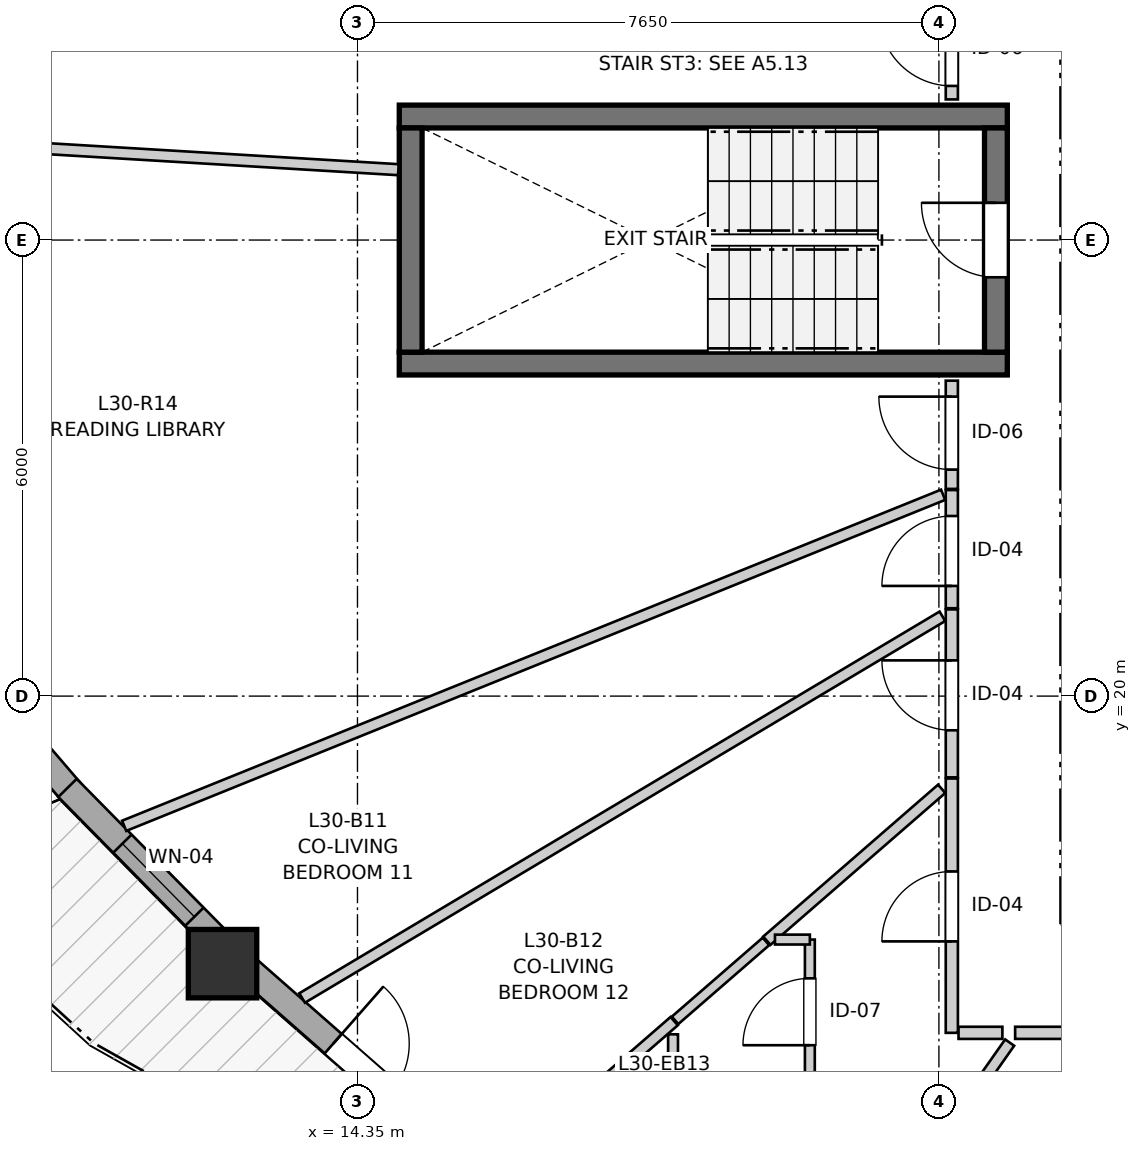
"""IFC4 building model, lengths in metres.
Left out: names, types, materials, properties, quantities, classifications, styles, units other than length and angle.
Written with IfcOpenShell. Run it as: python <this file> out.ifc"""

import sys

from ifc_helpers import new_model, si_unit, direction, frame, frame_2d, origin, origin_2d, place, context, subcontext, project, spatial, rectangle, extrude, source, transform, mapped, element, fill, save


model = new_model("IFC4")
c1 = context("Model", 3, precision=1e-05, world=origin(), true_north=direction((0.0, 1.0)))
c2 = subcontext(c1, "Body", "Model", "MODEL_VIEW")
j1 = project(units=[si_unit("LENGTHUNIT", "METRE"), si_unit("PLANEANGLEUNIT", "RADIAN")], contexts=[c1])
p1 = place(None, origin())
s1 = spatial("IfcSite", under=j1, at=p1, CompositionType="ELEMENT")
p2 = place(p1, origin())
s2 = spatial("IfcBuilding", under=s1, at=p2, CompositionType="ELEMENT")
p3 = place(p2, frame((0.0, 0.0, 102.4)))
s3 = spatial("IfcBuildingStorey", under=s2, at=p3, CompositionType="ELEMENT", Elevation=102.4)
for number, where, z_axis, x_axis in (
    (1, (14.9, 24.375, 0.0), (0.0, 0.0, 1.0), (1.0, 0.0, 0.0)),
    (2, (22.9, 27.625, 0.0), (0.0, 0.0, 1.0), (-1.0, 0.0, 0.0)),
):
    element("IfcWall", number, at=place(p3, frame(where, z_axis=z_axis, x_axis=x_axis)), inside=s3, PredefinedType="SHEAR", context=c2, shape_type="SweptSolid", body=[
        extrude(rectangle(XDim=8.0, YDim=0.3, at=frame_2d((4.0, 0.0))), origin(), (0.0, 0.0, 1.0), 2.95),
    ])
p4 = place(p3, frame((15.05, 27.475, 0.0), z_axis=(0.0, 0.0, 1.0), x_axis=(0.0, -1.0, 0.0)))
e3 = element("IfcWall", 3, at=p4, inside=s3, PredefinedType="SHEAR", context=c2, shape_type="SweptSolid", body=[
    extrude(rectangle(XDim=2.95, YDim=0.3, at=frame_2d((1.475, 0.0))), origin(), (0.0, 0.0, 1.0), 2.95),
])
p5 = place(p3, frame((22.75, 24.525, 0.0), z_axis=(0.0, 0.0, 1.0), x_axis=(0.0, 1.0, 0.0)))
e4 = element("IfcWall", 4, at=p5, inside=s3, PredefinedType="SHEAR", context=c2, shape_type="SweptSolid", body=[
    extrude(rectangle(XDim=2.95, YDim=0.3, at=frame_2d((1.475, 0.0))), origin(), (0.0, 0.0, 1.0), 2.95),
])
p6 = place(p5, frame((0.985, 0.0, 0.0)))
e5 = element("IfcOpeningElement", 5, at=p6, cuts=e4, PredefinedType="OPENING", context=c2, shape_type="SweptSolid", body=[
    extrude(rectangle(XDim=0.98, YDim=2.15, at=frame_2d((0.49, 1.075))), frame((0.0, 0.16, 0.0), z_axis=(0.0, -1.0, 0.0), x_axis=(1.0, 0.0, 0.0)), (0.0, 0.0, 1.0), 0.32),
])
m1 = source(origin(), c2, "Body", "SweptSolid", [
    extrude(rectangle(XDim=0.9, YDim=0.9, at=origin_2d()), origin(), (0.0, 0.0, 1.0), 2.95),
])
p7 = place(p3, frame((12.575, 16.48, 0.0), z_axis=(0.0, 0.0, 1.0), x_axis=(1.0, 0.0, 0.0)))
e6 = element("IfcColumn", 6, at=p7, inside=s3, PredefinedType="COLUMN", context=c2, shape_type="MappedRepresentation", body=[
    mapped(m1, transform((0.0, 0.0, 0.0), x_axis=(1.0, 0.0, 0.0), y_axis=(0.0, 1.0, 0.0), z_axis=(0.0, 0.0, 1.0), scale=1.0)),
])
p8 = place(p3, frame((8.562, 21.099, 0.0), z_axis=(0.0, 0.0, 1.0), x_axis=(0.650778499588, -0.75926763692, 0.0)))
e7 = element("IfcWall", 7, at=p8, inside=s3, PredefinedType="SOLIDWALL", context=c2, shape_type="SweptSolid", body=[
    extrude(rectangle(XDim=3.124, YDim=0.34, at=frame_2d((1.562, 0.0))), origin(), (0.0, 0.0, 1.0), 2.48),
])
p9 = place(p8, frame((0.727, 0.0, 0.82)))
e8 = element("IfcOpeningElement", 8, at=p9, cuts=e7, PredefinedType="OPENING", context=c2, shape_type="SweptSolid", body=[
    extrude(rectangle(XDim=1.65, YDim=1.45, at=frame_2d((0.825, 0.725))), frame((0.0, 0.18, 0.0), z_axis=(0.0, -1.0, 0.0), x_axis=(1.0, 0.0, 0.0)), (0.0, 0.0, 1.0), 0.36),
])
p10 = place(p3, frame((10.535, 18.792, 0.0), z_axis=(0.0, 0.0, 1.0), x_axis=(0.701902141766, -0.7122733909, 0.0)))
e9 = element("IfcWall", 9, at=p10, inside=s3, PredefinedType="SOLIDWALL", context=c2, shape_type="SweptSolid", body=[
    extrude(rectangle(XDim=2.848, YDim=0.34, at=frame_2d((1.424, 0.0))), origin(), (0.0, 0.0, 1.0), 2.48),
])
p11 = place(p10, frame((1.029, 0.0, 0.82)))
e10 = element("IfcOpeningElement", 10, at=p11, cuts=e9, PredefinedType="OPENING", context=c2, shape_type="SweptSolid", body=[
    extrude(rectangle(XDim=1.35, YDim=1.45, at=frame_2d((0.675, 0.725))), frame((0.0, 0.18, 0.0), z_axis=(0.0, -1.0, 0.0), x_axis=(1.0, 0.0, 0.0)), (0.0, 0.0, 1.0), 0.36),
])
p12 = place(p3, frame((12.86, 16.456, 0.0), z_axis=(0.0, 0.0, 1.0), x_axis=(0.751500349331, -0.659732692047, 0.0)))
e11 = element("IfcWall", 11, at=p12, inside=s3, PredefinedType="SOLIDWALL", context=c2, shape_type="SweptSolid", body=[
    extrude(rectangle(XDim=2.799, YDim=0.34, at=frame_2d((1.399, 0.0))), origin(), (0.0, 0.0, 1.0), 2.48),
])
p13 = place(p12, frame((1.559, 0.0, 0.0)))
e12 = element("IfcOpeningElement", 12, at=p13, cuts=e11, PredefinedType="OPENING", context=c2, shape_type="SweptSolid", body=[
    extrude(rectangle(XDim=1.0, YDim=2.1, at=frame_2d((0.5, 1.05))), frame((0.0, 0.18, 0.0), z_axis=(0.0, -1.0, 0.0), x_axis=(1.0, 0.0, 0.0)), (0.0, 0.0, 1.0), 0.36),
])
p14 = place(p3, frame((26.473, 15.57, 0.0), z_axis=(0.0, 0.0, 1.0), x_axis=(-1.0, 0.0, 0.0)))
e13 = element("IfcWall", 13, at=p14, inside=s3, PredefinedType="PARTITIONING", context=c2, shape_type="SweptSolid", body=[
    extrude(rectangle(XDim=3.47, YDim=0.16, at=frame_2d((1.735, 0.0))), origin(), (0.0, 0.0, 1.0), 2.95),
])
p15 = place(p14, frame((1.274, 0.0, 0.0)))
e14 = element("IfcOpeningElement", 14, at=p15, cuts=e13, PredefinedType="OPENING", context=c2, shape_type="SweptSolid", body=[
    extrude(rectangle(XDim=0.92, YDim=2.1, at=frame_2d((0.46, 1.05))), frame((0.0, 0.09, 0.0), z_axis=(0.0, -1.0, 0.0), x_axis=(1.0, 0.0, 0.0)), (0.0, 0.0, 1.0), 0.18),
])
p16 = place(p3, frame((22.17, 15.57, 0.0), z_axis=(0.0, 0.0, 1.0), x_axis=(0.0, 1.0, 0.0)))
e15 = element("IfcWall", 15, at=p16, inside=s3, PredefinedType="PARTITIONING", context=c2, shape_type="SweptSolid", body=[
    extrude(rectangle(XDim=3.346, YDim=0.16, at=frame_2d((1.673, 0.0))), origin(), (0.0, 0.0, 1.0), 2.95),
])
p17 = place(p16, frame((1.203, 0.0, 0.0)))
e16 = element("IfcOpeningElement", 16, at=p17, cuts=e15, PredefinedType="OPENING", context=c2, shape_type="SweptSolid", body=[
    extrude(rectangle(XDim=0.92, YDim=2.1, at=frame_2d((0.46, 1.05))), frame((0.0, 0.09, 0.0), z_axis=(0.0, -1.0, 0.0), x_axis=(1.0, 0.0, 0.0)), (0.0, 0.0, 1.0), 0.18),
])
p18 = place(p3, frame((22.17, 18.931, 0.0), z_axis=(0.0, 0.0, 1.0), x_axis=(0.0, 1.0, 0.0)))
e17 = element("IfcWall", 17, at=p18, inside=s3, PredefinedType="PARTITIONING", context=c2, shape_type="SweptSolid", body=[
    extrude(rectangle(XDim=2.21, YDim=0.16, at=frame_2d((1.105, 0.0))), origin(), (0.0, 0.0, 1.0), 2.95),
])
p19 = place(p18, frame((0.619, 0.0, 0.0)))
e18 = element("IfcOpeningElement", 18, at=p19, cuts=e17, PredefinedType="OPENING", context=c2, shape_type="SweptSolid", body=[
    extrude(rectangle(XDim=0.92, YDim=2.1, at=frame_2d((0.46, 1.05))), frame((0.0, 0.09, 0.0), z_axis=(0.0, -1.0, 0.0), x_axis=(1.0, 0.0, 0.0)), (0.0, 0.0, 1.0), 0.18),
])
p20 = place(p3, frame((20.302, 14.897, 0.0), z_axis=(0.0, 0.0, 1.0), x_axis=(0.0, 1.0, 0.0)))
e19 = element("IfcWall", 19, at=p20, inside=s3, PredefinedType="PARTITIONING", context=c2, shape_type="SweptSolid", body=[
    extrude(rectangle(XDim=1.9, YDim=0.13, at=frame_2d((0.95, 0.0))), origin(), (0.0, 0.0, 1.0), 2.95),
])
p21 = place(p20, frame((0.51, 0.0, 0.0)))
e20 = element("IfcOpeningElement", 20, at=p21, cuts=e19, PredefinedType="OPENING", context=c2, shape_type="SweptSolid", body=[
    extrude(rectangle(XDim=0.88, YDim=2.05, at=frame_2d((0.44, 1.025))), frame((0.0, 0.075, 0.0), z_axis=(0.0, -1.0, 0.0), x_axis=(1.0, 0.0, 0.0)), (0.0, 0.0, 1.0), 0.15),
])
p22 = place(p3, frame((22.17, 21.156, 0.0), z_axis=(0.0, 0.0, 1.0), x_axis=(0.0, 1.0, 0.0)))
e21 = element("IfcWall", 21, at=p22, inside=s3, PredefinedType="PARTITIONING", context=c2, shape_type="SweptSolid", body=[
    extrude(rectangle(XDim=1.555, YDim=0.16, at=frame_2d((0.777, 0.0))), origin(), (0.0, 0.0, 1.0), 2.95),
])
p23 = place(p22, frame((0.293, 0.0, 0.0)))
e22 = element("IfcOpeningElement", 22, at=p23, cuts=e21, PredefinedType="OPENING", context=c2, shape_type="SweptSolid", body=[
    extrude(rectangle(XDim=0.92, YDim=2.1, at=frame_2d((0.46, 1.05))), frame((0.0, 0.09, 0.0), z_axis=(0.0, -1.0, 0.0), x_axis=(1.0, 0.0, 0.0)), (0.0, 0.0, 1.0), 0.18),
])
p24 = place(p3, frame((22.17, 22.726, 0.0), z_axis=(0.0, 0.0, 1.0), x_axis=(0.0, 1.0, 0.0)))
e23 = element("IfcWall", 23, at=p24, inside=s3, PredefinedType="PARTITIONING", context=c2, shape_type="SweptSolid", body=[
    extrude(rectangle(XDim=1.424, YDim=0.16, at=frame_2d((0.712, 0.0))), origin(), (0.0, 0.0, 1.0), 2.95),
])
p25 = place(p24, frame((0.254, 0.0, 0.0)))
e24 = element("IfcOpeningElement", 24, at=p25, cuts=e23, PredefinedType="OPENING", context=c2, shape_type="SweptSolid", body=[
    extrude(rectangle(XDim=0.96, YDim=2.1, at=frame_2d((0.48, 1.05))), frame((0.0, 0.09, 0.0), z_axis=(0.0, -1.0, 0.0), x_axis=(1.0, 0.0, 0.0)), (0.0, 0.0, 1.0), 0.18),
])
p26 = place(p3, frame((22.17, 27.85, 0.0), z_axis=(0.0, 0.0, 1.0), x_axis=(0.0, 1.0, 0.0)))
e25 = element("IfcWall", 25, at=p26, inside=s3, PredefinedType="PARTITIONING", context=c2, shape_type="SweptSolid", body=[
    extrude(rectangle(XDim=1.283, YDim=0.16, at=frame_2d((0.642, 0.0))), origin(), (0.0, 0.0, 1.0), 2.95),
])
p27 = place(p26, frame((0.177, 0.0, 0.0)))
e26 = element("IfcOpeningElement", 26, at=p27, cuts=e25, PredefinedType="OPENING", context=c2, shape_type="SweptSolid", body=[
    extrude(rectangle(XDim=0.96, YDim=2.1, at=frame_2d((0.48, 1.05))), frame((0.0, 0.09, 0.0), z_axis=(0.0, -1.0, 0.0), x_axis=(1.0, 0.0, 0.0)), (0.0, 0.0, 1.0), 0.18),
])
p28 = place(p3, frame((11.28, 18.294, 0.0), z_axis=(0.0, 0.0, 1.0), x_axis=(0.927137862507, 0.374720407645, 0.0)))
e27 = element("IfcWall", 27, at=p28, inside=s3, PredefinedType="PARTITIONING", context=c2, shape_type="SweptSolid", body=[
    extrude(rectangle(XDim=11.622, YDim=0.145, at=frame_2d((5.811, 0.0))), origin(), (0.0, 0.0, 1.0), 2.95),
])
p29 = place(p3, frame((13.622, 16.028, 0.0), z_axis=(0.0, 0.0, 1.0), x_axis=(0.85896108151, 0.512040877716, 0.0)))
e28 = element("IfcWall", 28, at=p29, inside=s3, PredefinedType="PARTITIONING", context=c2, shape_type="SweptSolid", body=[
    extrude(rectangle(XDim=9.807, YDim=0.145, at=frame_2d((4.904, 0.0))), origin(), (0.0, 0.0, 1.0), 2.95),
])
p30 = place(p3, frame((6.18, 27.448, 0.0), z_axis=(0.0, 0.0, 1.0), x_axis=(0.998209995059, -0.059806402362, 0.0)))
e29 = element("IfcWall", 29, at=p30, inside=s3, PredefinedType="PARTITIONING", context=c2, shape_type="SweptSolid", body=[
    extrude(rectangle(XDim=8.724, YDim=0.145, at=frame_2d((4.362, 0.0))), origin(), (0.0, 0.0, 1.0), 2.95),
])
p31 = place(p3, frame((19.736, 16.782, 0.0), z_axis=(0.0, 0.0, 1.0), x_axis=(0.754964216329, 0.655765988796, 0.0)))
e30 = element("IfcWall", 30, at=p31, inside=s3, PredefinedType="PARTITIONING", context=c2, shape_type="SweptSolid", body=[
    extrude(rectangle(XDim=3.047, YDim=0.145, at=frame_2d((1.523, 0.0))), origin(), (0.0, 0.0, 1.0), 2.95),
])
p32 = place(p3, frame((16.33, 13.824, 0.0), z_axis=(0.0, 0.0, 1.0), x_axis=(0.754843145593, 0.655905348013, 0.0)))
e31 = element("IfcWall", 31, at=p32, inside=s3, PredefinedType="PARTITIONING", context=c2, shape_type="SweptSolid", body=[
    extrude(rectangle(XDim=2.897, YDim=0.145, at=frame_2d((1.448, 0.0))), origin(), (0.0, 0.0, 1.0), 2.95),
])
p33 = place(p3, frame((18.528, 15.734, 0.0), z_axis=(0.0, 0.0, 1.0), x_axis=(0.755063236967, 0.655651971843, 0.0)))
e32 = element("IfcWall", 32, at=p33, inside=s3, PredefinedType="PARTITIONING", context=c2, shape_type="SweptSolid", body=[
    extrude(rectangle(XDim=1.584, YDim=0.13, at=frame_2d((0.792, 0.0))), origin(), (0.0, 0.0, 1.0), 2.95),
])
p34 = place(p3, frame((22.37, 14.643, 0.0), z_axis=(0.0, 0.0, 1.0), x_axis=(0.575022445487, 0.818137633401, 0.0)))
e33 = element("IfcWall", 33, at=p34, inside=s3, PredefinedType="PARTITIONING", context=c2, shape_type="SweptSolid", body=[
    extrude(rectangle(XDim=0.976, YDim=0.145, at=frame_2d((0.488, 0.0))), origin(), (0.0, 0.0, 1.0), 2.95),
])
p35 = place(p3, frame((22.258, 15.57, 0.0), z_axis=(0.0, 0.0, 1.0), x_axis=(1.0, 0.0, 0.0)))
e34 = element("IfcWall", 34, at=p35, inside=s3, PredefinedType="PARTITIONING", context=c2, shape_type="SweptSolid", body=[
    extrude(rectangle(XDim=0.577, YDim=0.16, at=frame_2d((0.289, 0.0))), origin(), (0.0, 0.0, 1.0), 2.95),
])
p36 = place(p3, frame((18.502, 14.97, 0.0), z_axis=(0.0, 0.0, 1.0), x_axis=(0.0, 1.0, 0.0)))
e35 = element("IfcWall", 35, at=p36, inside=s3, PredefinedType="PARTITIONING", context=c2, shape_type="SweptSolid", body=[
    extrude(rectangle(XDim=0.581, YDim=0.13, at=frame_2d((0.29, 0.0))), origin(), (0.0, 0.0, 1.0), 2.95),
])
p37 = place(p3, frame((19.843, 16.797, 0.0), z_axis=(0.0, 0.0, 1.0), x_axis=(1.0, 0.0, 0.0)))
e36 = element("IfcWall", 36, at=p37, inside=s3, PredefinedType="PARTITIONING", context=c2, shape_type="SweptSolid", body=[
    extrude(rectangle(XDim=0.459, YDim=0.13, at=frame_2d((0.229, 0.0))), origin(), (0.0, 0.0, 1.0), 2.95),
])
m2 = source(origin(), c2, "Body", "SweptSolid", [
    extrude(rectangle(XDim=1.35, YDim=1.45, at=frame_2d((0.675, 0.725))), frame((0.0, 0.03, 0.0), z_axis=(0.0, -1.0, 0.0), x_axis=(1.0, 0.0, 0.0)), (0.0, 0.0, 1.0), 0.06),
])
p38 = place(p11, origin())
e37 = element("IfcWindow", 37, at=p38, inside=s3, PartitioningType="SINGLE_PANEL", PredefinedType="WINDOW", context=c2, shape_type="MappedRepresentation", body=[
    mapped(m2, transform((0.0, 0.0, 0.0), x_axis=(1.0, 0.0, 0.0), y_axis=(0.0, 1.0, 0.0), z_axis=(0.0, 0.0, 1.0), scale=1.0)),
])
fill(e10, e37)
m3 = source(origin(), c2, "Body", "SweptSolid", [
    extrude(rectangle(XDim=1.0, YDim=2.1, at=frame_2d((0.5, 1.05))), frame((0.0, 0.025, 0.0), z_axis=(0.0, -1.0, 0.0), x_axis=(1.0, 0.0, 0.0)), (0.0, 0.0, 1.0), 0.05),
])
p39 = place(p13, origin())
e38 = element("IfcDoor", 38, at=p39, inside=s3, OperationType="SINGLE_SWING_LEFT", PredefinedType="DOOR", context=c2, shape_type="MappedRepresentation", body=[
    mapped(m3, transform((0.0, 0.0, 0.0), x_axis=(1.0, 0.0, 0.0), y_axis=(0.0, 1.0, 0.0), z_axis=(0.0, 0.0, 1.0), scale=1.0)),
])
fill(e12, e38)
m4 = source(origin(), c2, "Body", "SweptSolid", [
    extrude(rectangle(XDim=0.98, YDim=2.15, at=frame_2d((0.49, 1.075))), frame((0.0, 0.025, 0.0), z_axis=(0.0, -1.0, 0.0), x_axis=(1.0, 0.0, 0.0)), (0.0, 0.0, 1.0), 0.05),
])
p40 = place(p6, origin())
e39 = element("IfcDoor", 39, at=p40, inside=s3, OperationType="SINGLE_SWING_RIGHT", PredefinedType="DOOR", context=c2, shape_type="MappedRepresentation", body=[
    mapped(m4, transform((0.0, 0.0, 0.0), x_axis=(1.0, 0.0, 0.0), y_axis=(0.0, 1.0, 0.0), z_axis=(0.0, 0.0, 1.0), scale=1.0)),
])
fill(e5, e39)
m5 = source(origin(), c2, "Body", "SweptSolid", [
    extrude(rectangle(XDim=0.92, YDim=2.1, at=frame_2d((0.46, 1.05))), frame((0.0, 0.025, 0.0), z_axis=(0.0, -1.0, 0.0), x_axis=(1.0, 0.0, 0.0)), (0.0, 0.0, 1.0), 0.05),
])
p41 = place(p17, origin())
e40 = element("IfcDoor", 40, at=p41, inside=s3, OperationType="SINGLE_SWING_LEFT", PredefinedType="DOOR", context=c2, shape_type="MappedRepresentation", body=[
    mapped(m5, transform((0.0, 0.0, 0.0), x_axis=(1.0, 0.0, 0.0), y_axis=(0.0, 1.0, 0.0), z_axis=(0.0, 0.0, 1.0), scale=1.0)),
])
fill(e16, e40)
p42 = place(p19, origin())
e41 = element("IfcDoor", 41, at=p42, inside=s3, OperationType="SINGLE_SWING_RIGHT", PredefinedType="DOOR", context=c2, shape_type="MappedRepresentation", body=[
    mapped(m5, transform((0.0, 0.0, 0.0), x_axis=(1.0, 0.0, 0.0), y_axis=(0.0, 1.0, 0.0), z_axis=(0.0, 0.0, 1.0), scale=1.0)),
])
fill(e18, e41)
m6 = source(origin(), c2, "Body", "SweptSolid", [
    extrude(rectangle(XDim=0.88, YDim=2.05, at=frame_2d((0.44, 1.025))), frame((0.0, 0.025, 0.0), z_axis=(0.0, -1.0, 0.0), x_axis=(1.0, 0.0, 0.0)), (0.0, 0.0, 1.0), 0.05),
])
p43 = place(p21, origin())
e42 = element("IfcDoor", 42, at=p43, inside=s3, OperationType="SINGLE_SWING_LEFT", PredefinedType="DOOR", context=c2, shape_type="MappedRepresentation", body=[
    mapped(m6, transform((0.0, 0.0, 0.0), x_axis=(1.0, 0.0, 0.0), y_axis=(0.0, 1.0, 0.0), z_axis=(0.0, 0.0, 1.0), scale=1.0)),
])
fill(e20, e42)
p44 = place(p23, origin())
e43 = element("IfcDoor", 43, at=p44, inside=s3, OperationType="SINGLE_SWING_LEFT", PredefinedType="DOOR", context=c2, shape_type="MappedRepresentation", body=[
    mapped(m5, transform((0.0, 0.0, 0.0), x_axis=(1.0, 0.0, 0.0), y_axis=(0.0, 1.0, 0.0), z_axis=(0.0, 0.0, 1.0), scale=1.0)),
])
fill(e22, e43)
m7 = source(origin(), c2, "Body", "SweptSolid", [
    extrude(rectangle(XDim=0.96, YDim=2.1, at=frame_2d((0.48, 1.05))), frame((0.0, 0.025, 0.0), z_axis=(0.0, -1.0, 0.0), x_axis=(1.0, 0.0, 0.0)), (0.0, 0.0, 1.0), 0.05),
])
p45 = place(p25, origin())
e44 = element("IfcDoor", 44, at=p45, inside=s3, OperationType="SINGLE_SWING_RIGHT", PredefinedType="DOOR", context=c2, shape_type="MappedRepresentation", body=[
    mapped(m7, transform((0.0, 0.0, 0.0), x_axis=(1.0, 0.0, 0.0), y_axis=(0.0, 1.0, 0.0), z_axis=(0.0, 0.0, 1.0), scale=1.0)),
])
fill(e24, e44)
p46 = place(p27, origin())
e45 = element("IfcDoor", 45, at=p46, inside=s3, OperationType="SINGLE_SWING_RIGHT", PredefinedType="DOOR", context=c2, shape_type="MappedRepresentation", body=[
    mapped(m7, transform((0.0, 0.0, 0.0), x_axis=(1.0, 0.0, 0.0), y_axis=(0.0, 1.0, 0.0), z_axis=(0.0, 0.0, 1.0), scale=1.0)),
])
fill(e26, e45)
save(model, sys.argv[1])
